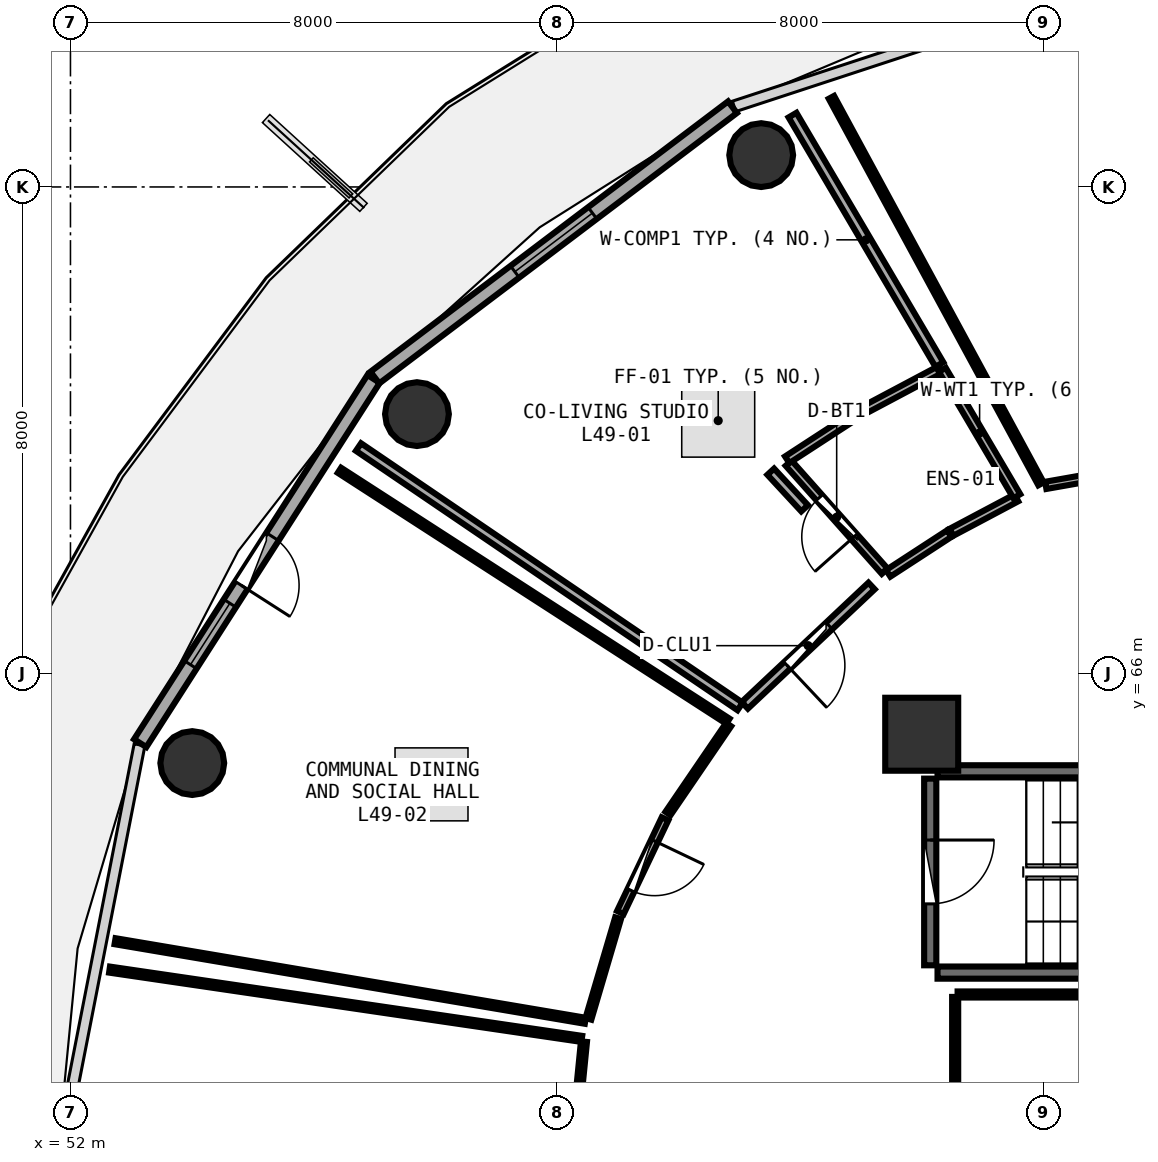
"""IFC4 building model, lengths in metres.
Left out: names, types, materials, properties, quantities, classifications, styles, units other than length and angle.
Written with IfcOpenShell. Run it as: python <this file> out.ifc"""

import sys

from ifc_helpers import new_model, si_unit, direction, frame, frame_2d, origin, origin_2d, place, context, subcontext, project, spatial, rectangle, circle, extrude, element, fill, save


model = new_model("IFC4")
c1 = context("Model", 3, precision=1e-05, world=origin(), true_north=direction((0.0, 1.0)))
c2 = subcontext(c1, "Body", "Model", "MODEL_VIEW")
j1 = project(units=[si_unit("LENGTHUNIT", "METRE"), si_unit("PLANEANGLEUNIT", "RADIAN")], contexts=[c1])
p1 = place(None, origin())
s1 = spatial("IfcSite", under=j1, at=p1, CompositionType="ELEMENT")
p2 = place(p1, origin())
s2 = spatial("IfcBuilding", under=s1, at=p2, CompositionType="ELEMENT")
p3 = place(p2, frame((0.0, 0.0, 193.2)))
s3 = spatial("IfcBuildingStorey", under=s2, at=p3, CompositionType="ELEMENT", Elevation=193.2)
p4 = place(p3, frame((66.0, 65.0, 0.0), z_axis=(0.0, 0.0, 1.0), x_axis=(1.0, 0.0, 0.0)))
e1 = element("IfcColumn", 1, at=p4, inside=s3, PredefinedType="PILASTER", context=c2, shape_type="SweptSolid", body=[
    extrude(rectangle(XDim=1.2, YDim=1.2, at=origin_2d()), origin(), (0.0, 0.0, 1.0), 3.75),
])
for number, where, z_axis, x_axis in (
    (2, (63.36, 74.524, 0.0), (0.0, 0.0, 1.0), (1.0, 0.0, 0.0)),
    (3, (57.698, 70.264, 0.0), (0.0, 0.0, 1.0), (1.0, 0.0, 0.0)),
    (4, (54.003, 64.526, 0.0), (0.0, 0.0, 1.0), (1.0, 0.0, 0.0)),
):
    element("IfcColumn", number, at=place(p3, frame(where, z_axis=z_axis, x_axis=x_axis)), inside=s3, PredefinedType="COLUMN", context=c2, shape_type="SweptSolid", body=[
        extrude(circle(Radius=0.525, at=origin_2d()), origin(), (0.0, 0.0, 1.0), 3.75),
    ])
p5 = place(p3, frame((62.888, 75.312, 0.0), z_axis=(0.0, 0.0, 1.0), x_axis=(-0.797701674595, -0.603052268338, 0.0)))
e5 = element("IfcWall", 5, at=p5, inside=s3, PredefinedType="SOLIDWALL", context=c2, shape_type="SweptSolid", body=[
    extrude(rectangle(XDim=7.374, YDim=0.24, at=frame_2d((3.687, 0.0))), origin(), (0.0, 0.0, 1.0), 3.475),
])
p6 = place(p5, frame((2.887, 0.0, 0.85)))
e6 = element("IfcOpeningElement", 6, at=p6, cuts=e5, PredefinedType="OPENING", context=c2, shape_type="SweptSolid", body=[
    extrude(rectangle(XDim=1.6, YDim=1.45, at=frame_2d((0.8, 0.725))), frame((0.0, 0.13, 0.0), z_axis=(0.0, -1.0, 0.0), x_axis=(1.0, 0.0, 0.0)), (0.0, 0.0, 1.0), 0.26),
])
p7 = place(p3, frame((56.986, 70.843, 0.0), z_axis=(0.0, 0.0, 1.0), x_axis=(-0.539539512973, -0.841960280501, 0.0)))
e7 = element("IfcWall", 7, at=p7, inside=s3, PredefinedType="SOLIDWALL", context=c2, shape_type="SweptSolid", body=[
    extrude(rectangle(XDim=7.115, YDim=0.24, at=frame_2d((3.557, 0.0))), origin(), (0.0, 0.0, 1.0), 3.475),
])
p8 = place(p7, frame((3.082, 0.0, 0.0)))
e8 = element("IfcOpeningElement", 8, at=p8, cuts=e7, PredefinedType="OPENING", context=c2, shape_type="SweptSolid", body=[
    extrude(rectangle(XDim=0.95, YDim=2.1, at=frame_2d((0.475, 1.05))), frame((0.0, 0.13, 0.0), z_axis=(0.0, -1.0, 0.0), x_axis=(1.0, 0.0, 0.0)), (0.0, 0.0, 1.0), 0.26),
])
p9 = place(p7, frame((4.382, 0.0, 0.85)))
e9 = element("IfcOpeningElement", 9, at=p9, cuts=e7, PredefinedType="OPENING", context=c2, shape_type="SweptSolid", body=[
    extrude(rectangle(XDim=1.2, YDim=1.45, at=frame_2d((0.6, 0.725))), frame((0.0, 0.13, 0.0), z_axis=(0.0, -1.0, 0.0), x_axis=(1.0, 0.0, 0.0)), (0.0, 0.0, 1.0), 0.26),
])
for number, where, z_axis, x_axis in (
    (10, (66.26, 61.08, 0.0), (0.0, 0.0, 1.0), (1.0, 0.0, 0.0)),
    (11, (73.42, 64.39, 0.0), (0.0, 0.0, 1.0), (-1.0, 0.0, 0.0)),
):
    element("IfcWall", number, at=place(p3, frame(where, z_axis=z_axis, x_axis=x_axis)), inside=s3, PredefinedType="SHEAR", context=c2, shape_type="SweptSolid", body=[
        extrude(rectangle(XDim=7.16, YDim=0.2, at=frame_2d((3.58, 0.0))), origin(), (0.0, 0.0, 1.0), 3.49),
    ])
p10 = place(p3, frame((66.14, 64.27, 0.0), z_axis=(0.0, 0.0, 1.0), x_axis=(0.0, -1.0, 0.0)))
e12 = element("IfcWall", 12, at=p10, inside=s3, PredefinedType="SHEAR", context=c2, shape_type="SweptSolid", body=[
    extrude(rectangle(XDim=3.07, YDim=0.2, at=frame_2d((1.535, 0.0))), origin(), (0.0, 0.0, 1.0), 3.49),
])
p11 = place(p10, frame((1.01, 0.0, 0.0)))
e13 = element("IfcOpeningElement", 13, at=p11, cuts=e12, PredefinedType="OPENING", context=c2, shape_type="SweptSolid", body=[
    extrude(rectangle(XDim=1.05, YDim=2.1, at=frame_2d((0.525, 1.05))), frame((0.0, 0.11, 0.0), z_axis=(0.0, -1.0, 0.0), x_axis=(1.0, 0.0, 0.0)), (0.0, 0.0, 1.0), 0.22),
])
p12 = place(p3, frame((74.839, 70.294, 0.0), z_axis=(0.0, 0.0, 1.0), x_axis=(-0.984743305916, -0.174013279532, 0.0)))
e14 = element("IfcWall", 14, at=p12, inside=s3, PredefinedType="PARTITIONING", context=c2, shape_type="SweptSolid", body=[
    extrude(rectangle(XDim=6.904, YDim=0.12, at=frame_2d((3.452, 0.0))), origin(), (0.0, 0.0, 1.0), 3.025),
])
p13 = place(p12, frame((3.002, 0.0, 0.0)))
e15 = element("IfcOpeningElement", 15, at=p13, cuts=e14, PredefinedType="OPENING", context=c2, shape_type="SweptSolid", body=[
    extrude(rectangle(XDim=0.9, YDim=2.08, at=frame_2d((0.45, 1.04))), frame((0.0, 0.07, 0.0), z_axis=(0.0, -1.0, 0.0), x_axis=(1.0, 0.0, 0.0)), (0.0, 0.0, 1.0), 0.14),
])
p14 = place(p3, frame((65.392, 67.68, 0.0), z_axis=(0.0, 0.0, 1.0), x_axis=(-0.664446610682, 0.747335735498, 0.0)))
e16 = element("IfcWall", 16, at=p14, inside=s3, PredefinedType="PLUMBINGWALL", context=c2, shape_type="SweptSolid", body=[
    extrude(rectangle(XDim=2.38, YDim=0.13, at=frame_2d((1.19, 0.0))), origin(), (0.0, 0.0, 1.0), 3.025),
])
p15 = place(p14, frame((0.76, 0.0, 0.0)))
e17 = element("IfcOpeningElement", 17, at=p15, cuts=e16, PredefinedType="OPENING", context=c2, shape_type="SweptSolid", body=[
    extrude(rectangle(XDim=0.86, YDim=2.05, at=frame_2d((0.43, 1.025))), frame((0.0, 0.075, 0.0), z_axis=(0.0, -1.0, 0.0), x_axis=(1.0, 0.0, 0.0)), (0.0, 0.0, 1.0), 0.15),
])
p16 = place(p3, frame((65.175, 67.438, 0.0), z_axis=(0.0, 0.0, 1.0), x_axis=(-0.728220012456, -0.685343427384, 0.0)))
e18 = element("IfcWall", 18, at=p16, inside=s3, PredefinedType="PARTITIONING", context=c2, shape_type="SweptSolid", body=[
    extrude(rectangle(XDim=2.864, YDim=0.15, at=frame_2d((1.432, 0.0))), origin(), (0.0, 0.0, 1.0), 3.025),
])
p17 = place(p16, frame((0.957, 0.0, 0.0)))
e19 = element("IfcOpeningElement", 19, at=p17, cuts=e18, PredefinedType="OPENING", context=c2, shape_type="SweptSolid", body=[
    extrude(rectangle(XDim=0.95, YDim=2.08, at=frame_2d((0.475, 1.04))), frame((0.0, 0.085, 0.0), z_axis=(0.0, -1.0, 0.0), x_axis=(1.0, 0.0, 0.0)), (0.0, 0.0, 1.0), 0.17),
])
p18 = place(p3, frame((61.778, 63.609, 0.0), z_axis=(0.0, 0.0, 1.0), x_axis=(-0.430372132133, -0.902651553969, 0.0)))
e20 = element("IfcWall", 20, at=p18, inside=s3, PredefinedType="PARTITIONING", context=c2, shape_type="SweptSolid", body=[
    extrude(rectangle(XDim=1.707, YDim=0.12, at=frame_2d((0.854, 0.0))), origin(), (0.0, 0.0, 1.0), 3.235),
])
p19 = place(p18, frame((0.403, 0.0, 0.0)))
e21 = element("IfcOpeningElement", 21, at=p19, cuts=e20, PredefinedType="OPENING", context=c2, shape_type="SweptSolid", body=[
    extrude(rectangle(XDim=0.9, YDim=2.08, at=frame_2d((0.45, 1.04))), frame((0.0, 0.07, 0.0), z_axis=(0.0, -1.0, 0.0), x_axis=(1.0, 0.0, 0.0)), (0.0, 0.0, 1.0), 0.14),
])
p20 = place(p3, frame((72.41, 60.72, 0.0), z_axis=(0.0, 0.0, 1.0), x_axis=(-1.0, 0.0, 0.0)))
e22 = element("IfcWall", 22, at=p20, inside=s3, PredefinedType="PARTITIONING", context=c2, shape_type="SweptSolid", body=[
    extrude(rectangle(XDim=5.82, YDim=0.1, at=frame_2d((2.91, 0.0))), origin(), (0.0, 0.0, 1.0), 3.48),
])
p21 = place(p3, frame((66.55, 60.68, 0.0), z_axis=(0.0, 0.0, 1.0), x_axis=(0.0, -1.0, 0.0)))
e23 = element("IfcWall", 23, at=p21, inside=s3, PredefinedType="PARTITIONING", context=c2, shape_type="SweptSolid", body=[
    extrude(rectangle(XDim=2.383, YDim=0.1, at=frame_2d((1.191, 0.0))), origin(), (0.0, 0.0, 1.0), 3.48),
])
p22 = place(p3, frame((67.962, 69.117, 0.0), z_axis=(0.0, 0.0, 1.0), x_axis=(-0.476664873876, 0.879085091452, 0.0)))
e24 = element("IfcWall", 24, at=p22, inside=s3, PredefinedType="PARTITIONING", context=c2, shape_type="SweptSolid", body=[
    extrude(rectangle(XDim=7.231, YDim=0.1, at=frame_2d((3.615, 0.0))), origin(), (0.0, 0.0, 1.0), 3.075),
])
p23 = place(p3, frame((67.557, 68.888, 0.0), z_axis=(0.0, 0.0, 1.0), x_axis=(-0.883222814273, -0.468953580162, 0.0)))
e25 = element("IfcWall", 25, at=p23, inside=s3, PredefinedType="PLUMBINGWALL", context=c2, shape_type="SweptSolid", body=[
    extrude(rectangle(XDim=1.21, YDim=0.13, at=frame_2d((0.605, 0.0))), origin(), (0.0, 0.0, 1.0), 3.235),
])
p24 = place(p3, frame((66.454, 68.3, 0.0), z_axis=(0.0, 0.0, 1.0), x_axis=(-0.838229624715, -0.545317427055, 0.0)))
e26 = element("IfcWall", 26, at=p24, inside=s3, PredefinedType="PLUMBINGWALL", context=c2, shape_type="SweptSolid", body=[
    extrude(rectangle(XDim=1.199, YDim=0.13, at=frame_2d((0.6, 0.0))), origin(), (0.0, 0.0, 1.0), 3.025),
])
p25 = place(p3, frame((63.788, 69.514, 0.0), z_axis=(0.0, 0.0, 1.0), x_axis=(0.838106296982, 0.545506952255, 0.0)))
e27 = element("IfcWall", 27, at=p25, inside=s3, PredefinedType="PLUMBINGWALL", context=c2, shape_type="SweptSolid", body=[
    extrude(rectangle(XDim=1.439, YDim=0.13, at=frame_2d((0.72, 0.0))), origin(), (0.0, 0.0, 1.0), 3.025),
])
p26 = place(p3, frame((65.029, 70.319, 0.0), z_axis=(0.0, 0.0, 1.0), x_axis=(0.883161427893, 0.469069176436, 0.0)))
e28 = element("IfcWall", 28, at=p26, inside=s3, PredefinedType="PLUMBINGWALL", context=c2, shape_type="SweptSolid", body=[
    extrude(rectangle(XDim=1.452, YDim=0.13, at=frame_2d((0.726, 0.0))), origin(), (0.0, 0.0, 1.0), 3.175),
])
p27 = place(p3, frame((66.339, 70.993, 0.0), z_axis=(0.0, 0.0, 1.0), x_axis=(0.507904175511, -0.861413575757, 0.0)))
e29 = element("IfcWall", 29, at=p27, inside=s3, PredefinedType="PLUMBINGWALL", context=c2, shape_type="SweptSolid", body=[
    extrude(rectangle(XDim=2.413, YDim=0.13, at=frame_2d((1.207, 0.0))), origin(), (0.0, 0.0, 1.0), 3.175),
])
p28 = place(p3, frame((63.013, 65.457, 0.0), z_axis=(0.0, 0.0, 1.0), x_axis=(-0.827032403996, 0.562154251732, 0.0)))
e30 = element("IfcWall", 30, at=p28, inside=s3, PredefinedType="PARTITIONING", context=c2, shape_type="SweptSolid", body=[
    extrude(rectangle(XDim=7.588, YDim=0.15, at=frame_2d((3.794, 0.0))), origin(), (0.0, 0.0, 1.0), 3.075),
])
p29 = place(p3, frame((63.875, 75.181, 0.0), z_axis=(0.0, 0.0, 1.0), x_axis=(0.507441443334, -0.861686243123, 0.0)))
e31 = element("IfcWall", 31, at=p29, inside=s3, PredefinedType="PARTITIONING", context=c2, shape_type="SweptSolid", body=[
    extrude(rectangle(XDim=4.76, YDim=0.15, at=frame_2d((2.38, 0.0))), origin(), (0.0, 0.0, 1.0), 3.075),
])
p30 = place(p3, frame((63.517, 69.318, 0.0), z_axis=(0.0, 0.0, 1.0), x_axis=(0.679342729124, -0.733821133782, 0.0)))
e32 = element("IfcWall", 32, at=p30, inside=s3, PredefinedType="PARTITIONING", context=c2, shape_type="SweptSolid", body=[
    extrude(rectangle(XDim=0.82, YDim=0.15, at=frame_2d((0.41, 0.0))), origin(), (0.0, 0.0, 1.0), 3.48),
])
p31 = place(p3, frame((62.824, 65.159, 0.0), z_axis=(0.0, 0.0, 1.0), x_axis=(-0.563576356576, -0.826063974707, 0.0)))
e33 = element("IfcWall", 33, at=p31, inside=s3, PredefinedType="PARTITIONING", context=c2, shape_type="SweptSolid", body=[
    extrude(rectangle(XDim=1.771, YDim=0.1, at=frame_2d((0.885, 0.0))), origin(), (0.0, 0.0, 1.0), 3.025),
])
p32 = place(p3, frame((61.007, 61.976, 0.0), z_axis=(0.0, 0.0, 1.0), x_axis=(-0.282778653399, -0.959185192328, 0.0)))
e34 = element("IfcWall", 34, at=p32, inside=s3, PredefinedType="PARTITIONING", context=c2, shape_type="SweptSolid", body=[
    extrude(rectangle(XDim=1.727, YDim=0.1, at=frame_2d((0.863, 0.0))), origin(), (0.0, 0.0, 1.0), 3.48),
])
p33 = place(p3, frame((60.468, 60.288, 0.0), z_axis=(0.0, 0.0, 1.0), x_axis=(-0.985986320585, 0.166826183855, 0.0)))
e35 = element("IfcWall", 35, at=p33, inside=s3, PredefinedType="PARTITIONING", context=c2, shape_type="SweptSolid", body=[
    extrude(rectangle(XDim=7.844, YDim=0.1, at=frame_2d((3.922, 0.0))), origin(), (0.0, 0.0, 1.0), 3.075),
])
p34 = place(p3, frame((56.424, 69.34, 0.0), z_axis=(0.0, 0.0, 1.0), x_axis=(0.840045167757, -0.542516466228, 0.0)))
e36 = element("IfcWall", 36, at=p34, inside=s3, PredefinedType="PARTITIONING", context=c2, shape_type="SweptSolid", body=[
    extrude(rectangle(XDim=7.607, YDim=0.1, at=frame_2d((3.803, 0.0))), origin(), (0.0, 0.0, 1.0), 3.075),
])
p35 = place(p3, frame((60.445, 59.944, 0.0), z_axis=(0.0, 0.0, 1.0), x_axis=(-0.09867193761, -0.995120017248, 0.0)))
e37 = element("IfcWall", 37, at=p35, inside=s3, PredefinedType="PARTITIONING", context=c2, shape_type="SweptSolid", body=[
    extrude(rectangle(XDim=1.715, YDim=0.1, at=frame_2d((0.857, 0.0))), origin(), (0.0, 0.0, 1.0), 3.48),
])
p36 = place(p3, frame((52.643, 61.129, 0.0), z_axis=(0.0, 0.0, 1.0), x_axis=(0.989410031557, -0.145147474846, 0.0)))
e38 = element("IfcWall", 38, at=p36, inside=s3, PredefinedType="PARTITIONING", context=c2, shape_type="SweptSolid", body=[
    extrude(rectangle(XDim=7.85, YDim=0.1, at=frame_2d((3.925, 0.0))), origin(), (0.0, 0.0, 1.0), 3.075),
])
p37 = place(p6, origin())
e39 = element("IfcWindow", 39, at=p37, inside=s3, PartitioningType="SINGLE_PANEL", PredefinedType="WINDOW", context=c2, shape_type="SweptSolid", body=[
    extrude(rectangle(XDim=1.6, YDim=1.45, at=frame_2d((0.8, 0.725))), frame((0.0, 0.03, 0.0), z_axis=(0.0, -1.0, 0.0), x_axis=(1.0, 0.0, 0.0)), (0.0, 0.0, 1.0), 0.06),
])
fill(e6, e39)
p38 = place(p8, frame((0.95, 0.0, 0.0), z_axis=(0.0, 0.0, 1.0), x_axis=(-1.0, 0.0, 0.0)))
e40 = element("IfcDoor", 40, at=p38, inside=s3, OperationType="SINGLE_SWING_LEFT", PredefinedType="DOOR", context=c2, shape_type="SweptSolid", body=[
    extrude(rectangle(XDim=0.95, YDim=2.1, at=frame_2d((0.475, 1.05))), frame((0.0, 0.025, 0.0), z_axis=(0.0, -1.0, 0.0), x_axis=(1.0, 0.0, 0.0)), (0.0, 0.0, 1.0), 0.05),
])
fill(e8, e40)
p39 = place(p9, origin())
e41 = element("IfcWindow", 41, at=p39, inside=s3, PartitioningType="SINGLE_PANEL", PredefinedType="WINDOW", context=c2, shape_type="SweptSolid", body=[
    extrude(rectangle(XDim=1.2, YDim=1.45, at=frame_2d((0.6, 0.725))), frame((0.0, 0.03, 0.0), z_axis=(0.0, -1.0, 0.0), x_axis=(1.0, 0.0, 0.0)), (0.0, 0.0, 1.0), 0.06),
])
fill(e9, e41)
p40 = place(p11, origin())
e42 = element("IfcDoor", 42, at=p40, inside=s3, OperationType="SINGLE_SWING_LEFT", PredefinedType="DOOR", context=c2, shape_type="SweptSolid", body=[
    extrude(rectangle(XDim=1.05, YDim=2.1, at=frame_2d((0.525, 1.05))), frame((0.0, 0.025, 0.0), z_axis=(0.0, -1.0, 0.0), x_axis=(1.0, 0.0, 0.0)), (0.0, 0.0, 1.0), 0.05),
])
fill(e13, e42)
p41 = place(p15, origin())
e43 = element("IfcDoor", 43, at=p41, inside=s3, OperationType="SINGLE_SWING_LEFT", PredefinedType="DOOR", context=c2, shape_type="SweptSolid", body=[
    extrude(rectangle(XDim=0.86, YDim=2.05, at=frame_2d((0.43, 1.025))), frame((0.0, 0.025, 0.0), z_axis=(0.0, -1.0, 0.0), x_axis=(1.0, 0.0, 0.0)), (0.0, 0.0, 1.0), 0.05),
])
fill(e17, e43)
p42 = place(p17, origin())
e44 = element("IfcDoor", 44, at=p42, inside=s3, OperationType="SINGLE_SWING_RIGHT", PredefinedType="DOOR", context=c2, shape_type="SweptSolid", body=[
    extrude(rectangle(XDim=0.95, YDim=2.08, at=frame_2d((0.475, 1.04))), frame((0.0, 0.025, 0.0), z_axis=(0.0, -1.0, 0.0), x_axis=(1.0, 0.0, 0.0)), (0.0, 0.0, 1.0), 0.05),
])
fill(e19, e44)
p43 = place(p19, origin())
e45 = element("IfcDoor", 45, at=p43, inside=s3, OperationType="SINGLE_SWING_LEFT", PredefinedType="DOOR", context=c2, shape_type="SweptSolid", body=[
    extrude(rectangle(XDim=0.9, YDim=2.08, at=frame_2d((0.45, 1.04))), frame((0.0, 0.025, 0.0), z_axis=(0.0, -1.0, 0.0), x_axis=(1.0, 0.0, 0.0)), (0.0, 0.0, 1.0), 0.05),
])
fill(e21, e45)
save(model, sys.argv[1])
